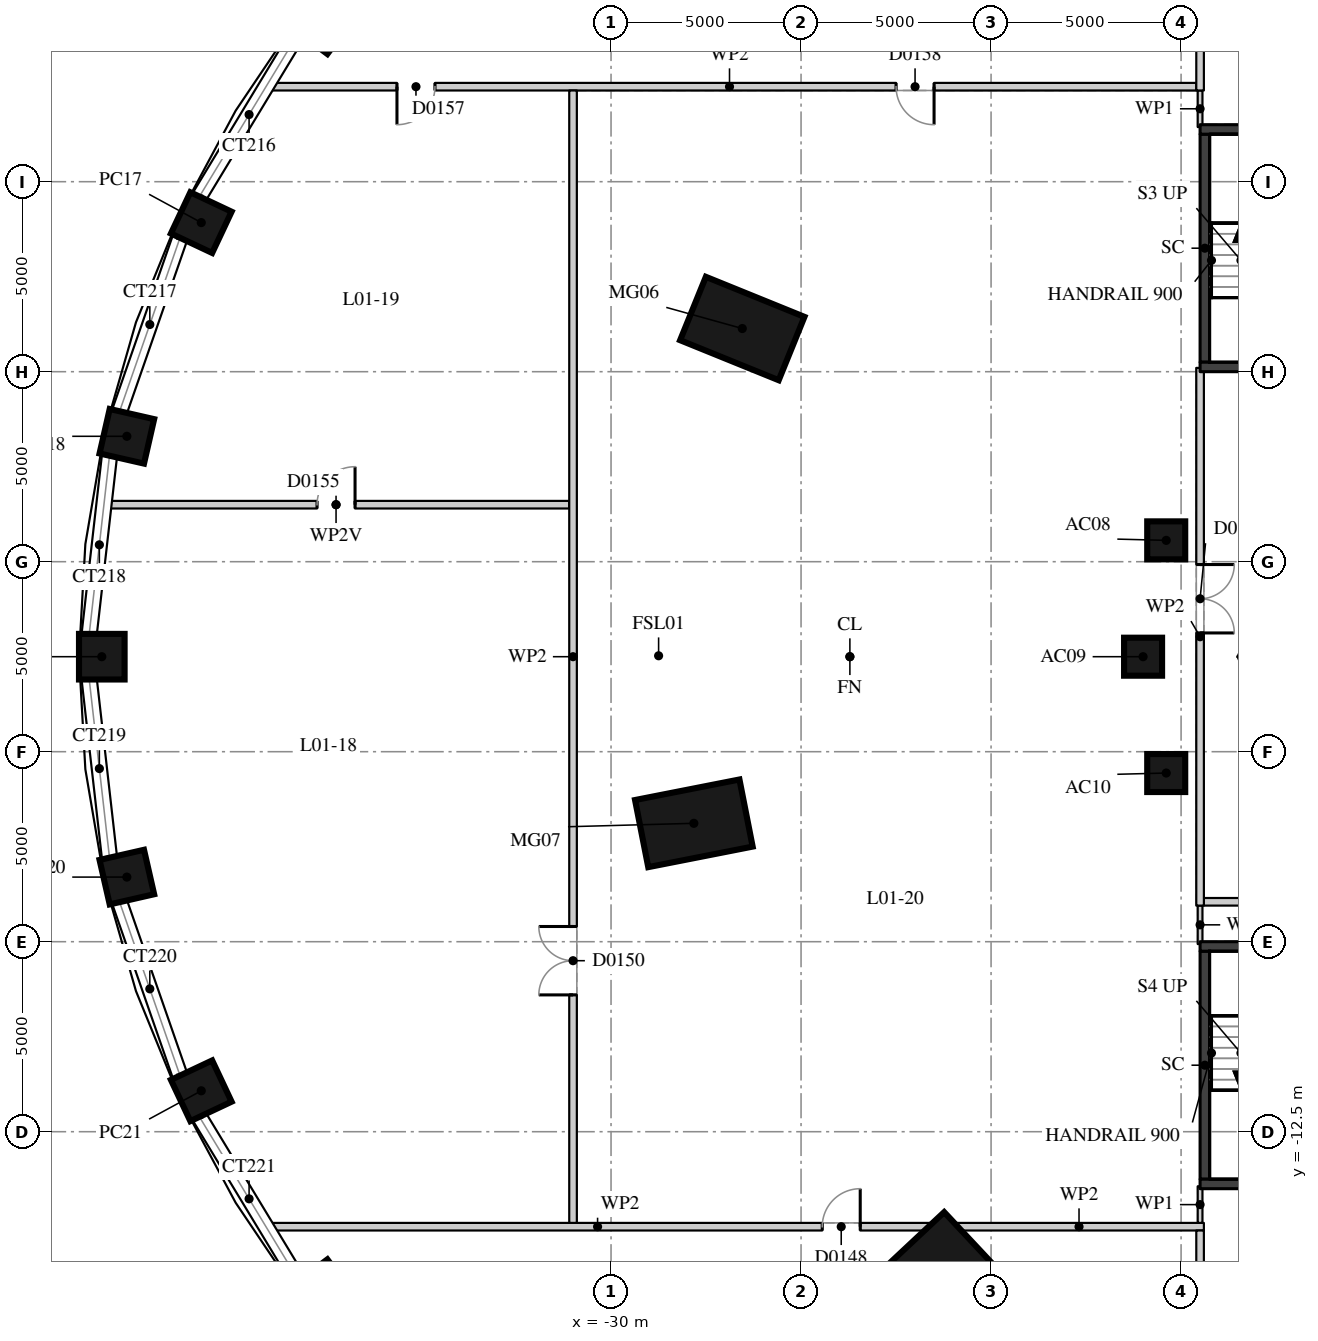
"""IFC4 building model, lengths in metres.
Left out: names, types, materials, properties, quantities, classifications, styles, units other than length and angle.
Written with IfcOpenShell. Run it as: python <this file> out.ifc"""

import sys

from ifc_helpers import new_model, si_unit, direction, frame, frame_2d, origin, origin_2d, place, context, subcontext, project, spatial, rectangle, extrude, element, fill, save


model = new_model("IFC4")
c1 = context("Model", 3, precision=1e-05, world=origin(), true_north=direction((0.0, 1.0)))
c2 = subcontext(c1, "Body", "Model", "MODEL_VIEW")
j1 = project(units=[si_unit("LENGTHUNIT", "METRE"), si_unit("PLANEANGLEUNIT", "RADIAN")], contexts=[c1])
p1 = place(None, origin())
s1 = spatial("IfcSite", under=j1, at=p1, CompositionType="ELEMENT")
p2 = place(p1, origin())
s2 = spatial("IfcBuilding", under=s1, at=p2, CompositionType="ELEMENT")
p3 = place(p2, frame((0.0, 0.0, 7.5)))
s3 = spatial("IfcBuildingStorey", under=s2, at=p3, CompositionType="ELEMENT", Elevation=7.5)
for number, where, z_axis, x_axis in (
    (1, (-26.546, 8.636, 0.0), (0.0, 0.0, 1.0), (-0.927, 0.376, 0.0)),
    (2, (-27.821, -4.385, 0.0), (0.0, 0.0, 1.0), (-0.981, -0.193, 0.0)),
    (3, (-21.641, -16.23, 0.0), (0.0, 0.0, 1.0), (-0.73, -0.683, 0.0)),
):
    element("IfcColumn", number, at=place(p3, frame(where, z_axis=z_axis, x_axis=x_axis)), inside=s3, PredefinedType="COLUMN", context=c2, shape_type="SweptSolid", body=[
        extrude(rectangle(XDim=2.8, YDim=1.8, at=origin_2d()), origin(), (0.0, 0.0, 1.0), 5.0),
    ])
for number, where, z_axis, x_axis in (
    (4, (-15.391, 3.062, 0.0), (0.0, 0.0, 1.0), (1.0, 0.0, 0.0)),
    (5, (-16.0, 0.0, 0.0), (0.0, 0.0, 1.0), (1.0, 0.0, 0.0)),
    (6, (-15.391, -3.062, 0.0), (0.0, 0.0, 1.0), (1.0, 0.0, 0.0)),
):
    element("IfcColumn", number, at=place(p3, frame(where, z_axis=z_axis, x_axis=x_axis)), inside=s3, PredefinedType="COLUMN", context=c2, shape_type="SweptSolid", body=[
        extrude(rectangle(XDim=1.0, YDim=1.0, at=origin_2d()), origin(), (0.0, 0.0, 1.0), 5.0),
    ])
for number, where, z_axis, x_axis in (
    (7, (-37.585, 16.7, 0.0), (0.0, 0.0, 1.0), (-0.801, 0.599, 0.0)),
    (8, (-40.783, 11.424, 0.0), (0.0, 0.0, 1.0), (-0.905, 0.426, 0.0)),
    (9, (-42.741, 5.8, 0.0), (0.0, 0.0, 1.0), (-0.975, 0.222, 0.0)),
    (10, (-43.4, 0.0, 0.0), (0.0, 0.0, 1.0), (-1.0, 0.0, 0.0)),
    (11, (-42.741, -5.8, 0.0), (0.0, 0.0, 1.0), (-0.975, -0.222, 0.0)),
    (12, (-40.783, -11.424, 0.0), (0.0, 0.0, 1.0), (-0.905, -0.426, 0.0)),
    (13, (-37.585, -16.7, 0.0), (0.0, 0.0, 1.0), (-0.801, -0.599, 0.0)),
):
    element("IfcColumn", number, at=place(p3, frame(where, z_axis=z_axis, x_axis=x_axis)), inside=s3, PredefinedType="COLUMN", context=c2, shape_type="SweptSolid", body=[
        extrude(rectangle(XDim=1.2, YDim=1.2, at=origin_2d()), origin(), (0.0, 0.0, 1.0), 5.0),
    ])
p4 = place(p3, frame((-14.375, 7.75, -0.41), z_axis=(0.0, 0.0, 1.0), x_axis=(0.0, 1.0, 0.0)))
e14 = element("IfcWall", 14, at=p4, inside=s3, PredefinedType="SHEAR", context=c2, shape_type="SweptSolid", body=[
    extrude(rectangle(XDim=6.0, YDim=0.25, at=frame_2d((3.0, 0.0))), origin(), (0.0, 0.0, 1.0), 5.0),
])
for number, where, z_axis, x_axis in (
    (15, (-14.5, 13.875, -0.41), (0.0, 0.0, 1.0), (1.0, 0.0, 0.0)),
    (16, (-14.5, 7.625, -0.41), (0.0, 0.0, 1.0), (1.0, 0.0, 0.0)),
):
    element("IfcWall", number, at=place(p3, frame(where, z_axis=z_axis, x_axis=x_axis)), inside=s3, PredefinedType="SHEAR", context=c2, shape_type="SweptSolid", body=[
        extrude(rectangle(XDim=5.2, YDim=0.25, at=frame_2d((2.6, 0.0))), origin(), (0.0, 0.0, 1.0), 5.0),
    ])
p5 = place(p3, frame((-14.375, -13.75, -0.41), z_axis=(0.0, 0.0, 1.0), x_axis=(0.0, 1.0, 0.0)))
e17 = element("IfcWall", 17, at=p5, inside=s3, PredefinedType="SHEAR", context=c2, shape_type="SweptSolid", body=[
    extrude(rectangle(XDim=6.0, YDim=0.25, at=frame_2d((3.0, 0.0))), origin(), (0.0, 0.0, 1.0), 5.0),
])
for number, where, z_axis, x_axis in (
    (18, (-14.5, -7.625, -0.41), (0.0, 0.0, 1.0), (1.0, 0.0, 0.0)),
    (19, (-14.5, -13.875, -0.41), (0.0, 0.0, 1.0), (1.0, 0.0, 0.0)),
):
    element("IfcWall", number, at=place(p3, frame(where, z_axis=z_axis, x_axis=x_axis)), inside=s3, PredefinedType="SHEAR", context=c2, shape_type="SweptSolid", body=[
        extrude(rectangle(XDim=5.2, YDim=0.25, at=frame_2d((2.6, 0.0))), origin(), (0.0, 0.0, 1.0), 5.0),
    ])
p6 = place(p3, frame((-39.165, -15.0, 0.0), z_axis=(0.0, 0.0, 1.0), x_axis=(1.0, 0.0, 0.0)))
e20 = element("IfcWall", 20, at=p6, inside=s3, PredefinedType="PARTITIONING", context=c2, shape_type="SweptSolid", body=[
    extrude(rectangle(XDim=17.622, YDim=0.2, at=frame_2d((8.811, 0.0))), origin(), (0.0, 0.0, 1.0), 4.59),
])
p7 = place(p6, frame((14.722, 0.0, 0.0)))
e21 = element("IfcOpeningElement", 21, at=p7, cuts=e20, PredefinedType="OPENING", context=c2, shape_type="SweptSolid", body=[
    extrude(rectangle(XDim=1.0, YDim=2.1, at=frame_2d((0.5, 1.05))), frame((0.0, 0.11, 0.0), z_axis=(0.0, -1.0, 0.0), x_axis=(1.0, 0.0, 0.0)), (0.0, 0.0, 1.0), 0.22),
])
p8 = place(p3, frame((-20.971, -15.0, 0.0), z_axis=(0.0, 0.0, 1.0), x_axis=(1.0, 0.0, 0.0)))
e22 = element("IfcWall", 22, at=p8, inside=s3, PredefinedType="PARTITIONING", context=c2, shape_type="SweptSolid", body=[
    extrude(rectangle(XDim=6.571, YDim=0.2, at=frame_2d((3.286, 0.0))), origin(), (0.0, 0.0, 1.0), 4.59),
])
p9 = place(p3, frame((-14.4, -6.45, 0.0), z_axis=(0.0, 0.0, 1.0), x_axis=(1.0, 0.0, 0.0)))
e23 = element("IfcWall", 23, at=p9, inside=s3, PredefinedType="PARTITIONING", context=c2, shape_type="SweptSolid", body=[
    extrude(rectangle(XDim=18.402, YDim=0.2, at=frame_2d((9.201, 0.0))), origin(), (0.0, 0.0, 1.0), 4.59),
])
p10 = place(p9, frame((8.001, 0.0, 0.0)))
e24 = element("IfcOpeningElement", 24, at=p10, cuts=e23, PredefinedType="OPENING", context=c2, shape_type="SweptSolid", body=[
    extrude(rectangle(XDim=2.4, YDim=2.4, at=frame_2d((1.2, 1.2))), frame((0.0, 0.11, 0.0), z_axis=(0.0, -1.0, 0.0), x_axis=(1.0, 0.0, 0.0)), (0.0, 0.0, 1.0), 0.22),
])
p11 = place(p3, frame((-43.372, 4.0, 0.0), z_axis=(0.0, 0.0, 1.0), x_axis=(1.0, 0.0, 0.0)))
e25 = element("IfcWall", 25, at=p11, inside=s3, PredefinedType="PARTITIONING", context=c2, shape_type="SweptSolid", body=[
    extrude(rectangle(XDim=12.271, YDim=0.2, at=frame_2d((6.136, 0.0))), origin(), (0.0, 0.0, 1.0), 3.59),
])
p12 = place(p11, frame((5.635, 0.0, 0.0)))
e26 = element("IfcOpeningElement", 26, at=p12, cuts=e25, PredefinedType="OPENING", context=c2, shape_type="SweptSolid", body=[
    extrude(rectangle(XDim=1.0, YDim=2.1, at=frame_2d((0.5, 1.05))), frame((0.0, 0.11, 0.0), z_axis=(0.0, -1.0, 0.0), x_axis=(1.0, 0.0, 0.0)), (0.0, 0.0, 1.0), 0.22),
])
p13 = place(p3, frame((-39.165, 15.0, 0.0), z_axis=(0.0, 0.0, 1.0), x_axis=(1.0, 0.0, 0.0)))
e27 = element("IfcWall", 27, at=p13, inside=s3, PredefinedType="PARTITIONING", context=c2, shape_type="SweptSolid", body=[
    extrude(rectangle(XDim=24.565, YDim=0.2, at=frame_2d((12.283, 0.0))), origin(), (0.0, 0.0, 1.0), 4.59),
])
p14 = place(p13, frame((3.532, 0.0, 0.0)))
e28 = element("IfcOpeningElement", 28, at=p14, cuts=e27, PredefinedType="OPENING", context=c2, shape_type="SweptSolid", body=[
    extrude(rectangle(XDim=1.0, YDim=2.1, at=frame_2d((0.5, 1.05))), frame((0.0, 0.11, 0.0), z_axis=(0.0, -1.0, 0.0), x_axis=(1.0, 0.0, 0.0)), (0.0, 0.0, 1.0), 0.22),
])
p15 = place(p13, frame((16.665, 0.0, 0.0)))
e29 = element("IfcOpeningElement", 29, at=p15, cuts=e27, PredefinedType="OPENING", context=c2, shape_type="SweptSolid", body=[
    extrude(rectangle(XDim=1.0, YDim=2.1, at=frame_2d((0.5, 1.05))), frame((0.0, 0.11, 0.0), z_axis=(0.0, -1.0, 0.0), x_axis=(1.0, 0.0, 0.0)), (0.0, 0.0, 1.0), 0.22),
])
p16 = place(p3, frame((-31.0, -14.9, 0.0), z_axis=(0.0, 0.0, 1.0), x_axis=(0.0, 1.0, 0.0)))
e30 = element("IfcWall", 30, at=p16, inside=s3, PredefinedType="PARTITIONING", context=c2, shape_type="SweptSolid", body=[
    extrude(rectangle(XDim=29.8, YDim=0.2, at=frame_2d((14.9, 0.0))), origin(), (0.0, 0.0, 1.0), 4.59),
])
p17 = place(p16, frame((6.0, 0.0, 0.0)))
e31 = element("IfcOpeningElement", 31, at=p17, cuts=e30, PredefinedType="OPENING", context=c2, shape_type="SweptSolid", body=[
    extrude(rectangle(XDim=1.8, YDim=2.1, at=frame_2d((0.9, 1.05))), frame((0.0, 0.11, 0.0), z_axis=(0.0, -1.0, 0.0), x_axis=(1.0, 0.0, 0.0)), (0.0, 0.0, 1.0), 0.22),
])
p18 = place(p3, frame((-14.5, -17.9, 0.0), z_axis=(0.0, 0.0, 1.0), x_axis=(0.0, 1.0, 0.0)))
e32 = element("IfcWall", 32, at=p18, inside=s3, PredefinedType="PARTITIONING", context=c2, shape_type="SweptSolid", body=[
    extrude(rectangle(XDim=2.8, YDim=0.2, at=frame_2d((1.4, 0.0))), origin(), (0.0, 0.0, 1.0), 4.14),
])
p19 = place(p3, frame((-14.5, -14.9, 0.0), z_axis=(0.0, 0.0, 1.0), x_axis=(0.0, 1.0, 0.0)))
e33 = element("IfcWall", 33, at=p19, inside=s3, PredefinedType="PARTITIONING", context=c2, shape_type="SweptSolid", body=[
    extrude(rectangle(XDim=0.962, YDim=0.125, at=frame_2d((0.481, 0.0))), origin(), (0.0, 0.0, 1.0), 4.59),
])
p20 = place(p3, frame((-14.5, -7.562, 0.0), z_axis=(0.0, 0.0, 1.0), x_axis=(0.0, 1.0, 0.0)))
e34 = element("IfcWall", 34, at=p20, inside=s3, PredefinedType="PARTITIONING", context=c2, shape_type="SweptSolid", body=[
    extrude(rectangle(XDim=1.012, YDim=0.125, at=frame_2d((0.506, 0.0))), origin(), (0.0, 0.0, 1.0), 4.59),
])
p21 = place(p3, frame((-14.5, -6.55, 0.0), z_axis=(0.0, 0.0, 1.0), x_axis=(0.0, 1.0, 0.0)))
e35 = element("IfcWall", 35, at=p21, inside=s3, PredefinedType="PARTITIONING", context=c2, shape_type="SweptSolid", body=[
    extrude(rectangle(XDim=14.15, YDim=0.2, at=frame_2d((7.075, 0.0))), origin(), (0.0, 0.0, 1.0), 4.59),
])
p22 = place(p21, frame((7.175, 0.0, 0.0)))
e36 = element("IfcOpeningElement", 36, at=p22, cuts=e35, PredefinedType="OPENING", context=c2, shape_type="SweptSolid", body=[
    extrude(rectangle(XDim=1.8, YDim=2.4, at=frame_2d((0.9, 1.2))), frame((0.0, 0.11, 0.0), z_axis=(0.0, -1.0, 0.0), x_axis=(1.0, 0.0, 0.0)), (0.0, 0.0, 1.0), 0.22),
])
p23 = place(p3, frame((-14.5, 13.938, 0.0), z_axis=(0.0, 0.0, 1.0), x_axis=(0.0, 1.0, 0.0)))
e37 = element("IfcWall", 37, at=p23, inside=s3, PredefinedType="PARTITIONING", context=c2, shape_type="SweptSolid", body=[
    extrude(rectangle(XDim=0.962, YDim=0.125, at=frame_2d((0.481, 0.0))), origin(), (0.0, 0.0, 1.0), 4.59),
])
p24 = place(p3, frame((-14.5, 14.9, 0.0), z_axis=(0.0, 0.0, 1.0), x_axis=(0.0, 1.0, 0.0)))
e38 = element("IfcWall", 38, at=p24, inside=s3, PredefinedType="PARTITIONING", context=c2, shape_type="SweptSolid", body=[
    extrude(rectangle(XDim=16.903, YDim=0.2, at=frame_2d((8.452, 0.0))), origin(), (0.0, 0.0, 1.0), 4.14),
])
p25 = place(p22, origin())
e39 = element("IfcDoor", 39, at=p25, inside=s3, OperationType="DOUBLE_DOOR_SINGLE_SWING", PredefinedType="DOOR", context=c2, shape_type="SweptSolid", body=[
    extrude(rectangle(XDim=1.8, YDim=2.4, at=frame_2d((0.9, 1.2))), frame((0.0, 0.025, 0.0), z_axis=(0.0, -1.0, 0.0), x_axis=(1.0, 0.0, 0.0)), (0.0, 0.0, 1.0), 0.05),
])
fill(e36, e39)
p26 = place(p17, origin())
e40 = element("IfcDoor", 40, at=p26, inside=s3, OperationType="DOUBLE_DOOR_SINGLE_SWING", PredefinedType="DOOR", context=c2, shape_type="SweptSolid", body=[
    extrude(rectangle(XDim=1.8, YDim=2.1, at=frame_2d((0.9, 1.05))), frame((0.0, 0.025, 0.0), z_axis=(0.0, -1.0, 0.0), x_axis=(1.0, 0.0, 0.0)), (0.0, 0.0, 1.0), 0.05),
])
fill(e31, e40)
p27 = place(p12, origin())
e41 = element("IfcDoor", 41, at=p27, inside=s3, OperationType="SINGLE_SWING_RIGHT", PredefinedType="DOOR", context=c2, shape_type="SweptSolid", body=[
    extrude(rectangle(XDim=1.0, YDim=2.1, at=frame_2d((0.5, 1.05))), frame((0.0, 0.025, 0.0), z_axis=(0.0, -1.0, 0.0), x_axis=(1.0, 0.0, 0.0)), (0.0, 0.0, 1.0), 0.05),
])
fill(e26, e41)
p28 = place(p14, origin())
e42 = element("IfcDoor", 42, at=p28, inside=s3, OperationType="SINGLE_SWING_RIGHT", PredefinedType="DOOR", context=c2, shape_type="SweptSolid", body=[
    extrude(rectangle(XDim=1.0, YDim=2.1, at=frame_2d((0.5, 1.05))), frame((0.0, 0.025, 0.0), z_axis=(0.0, -1.0, 0.0), x_axis=(1.0, 0.0, 0.0)), (0.0, 0.0, 1.0), 0.05),
])
fill(e28, e42)
p29 = place(p15, origin())
e43 = element("IfcDoor", 43, at=p29, inside=s3, OperationType="SINGLE_SWING_LEFT", PredefinedType="DOOR", context=c2, shape_type="SweptSolid", body=[
    extrude(rectangle(XDim=1.0, YDim=2.1, at=frame_2d((0.5, 1.05))), frame((0.0, 0.025, 0.0), z_axis=(0.0, -1.0, 0.0), x_axis=(1.0, 0.0, 0.0)), (0.0, 0.0, 1.0), 0.05),
])
fill(e29, e43)
p30 = place(p7, origin())
e44 = element("IfcDoor", 44, at=p30, inside=s3, OperationType="SINGLE_SWING_RIGHT", PredefinedType="DOOR", context=c2, shape_type="SweptSolid", body=[
    extrude(rectangle(XDim=1.0, YDim=2.1, at=frame_2d((0.5, 1.05))), frame((0.0, 0.025, 0.0), z_axis=(0.0, -1.0, 0.0), x_axis=(1.0, 0.0, 0.0)), (0.0, 0.0, 1.0), 0.05),
])
fill(e21, e44)
save(model, sys.argv[1])
